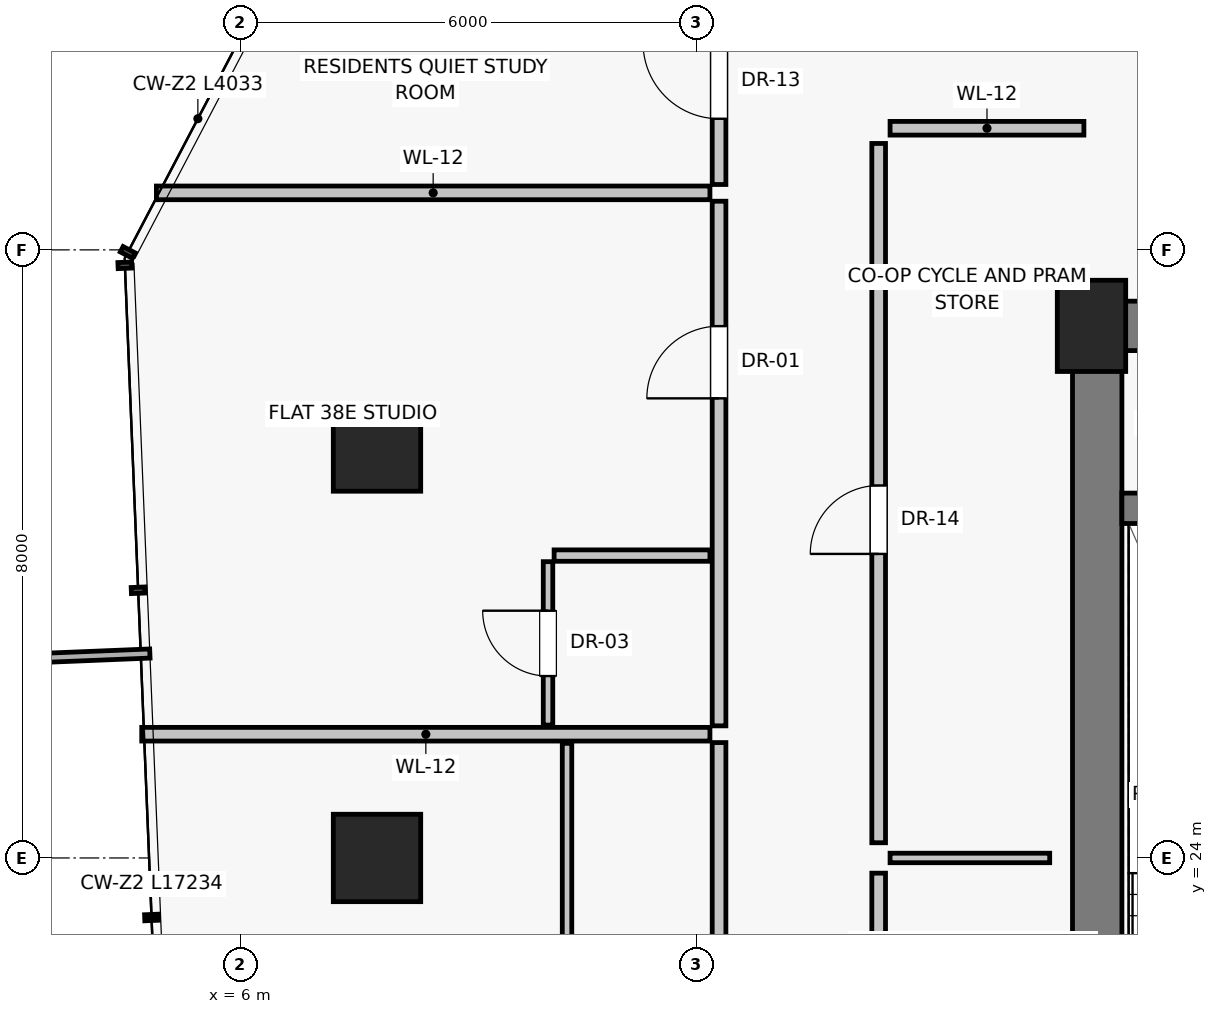
"""IFC4 building model, lengths in metres.
Left out: names, types, materials, properties, quantities, classifications, styles, units other than length and angle.
Written with IfcOpenShell. Run it as: python <this file> out.ifc"""

import sys

from ifc_helpers import new_model, si_unit, direction, frame, frame_2d, origin, origin_2d, place, context, subcontext, project, spatial, rectangle, extrude, source, transform, mapped, element, fill, save


model = new_model("IFC4")
c1 = context("Model", 3, precision=1e-05, world=origin(), true_north=direction((0.0, 1.0)))
c2 = subcontext(c1, "Body", "Model", "MODEL_VIEW")
j1 = project(units=[si_unit("LENGTHUNIT", "METRE"), si_unit("PLANEANGLEUNIT", "RADIAN")], contexts=[c1])
p1 = place(None, origin())
s1 = spatial("IfcSite", under=j1, at=p1, CompositionType="ELEMENT")
p2 = place(p1, origin())
s2 = spatial("IfcBuilding", under=s1, at=p2, CompositionType="ELEMENT")
p3 = place(p2, frame((0.0, 0.0, 136.0)))
s3 = spatial("IfcBuildingStorey", under=s2, at=p3, CompositionType="ELEMENT", Elevation=136.0)
p4 = place(p3, frame((17.2, 31.0, 0.0), z_axis=(0.0, 0.0, 1.0), x_axis=(1.0, 0.0, 0.0)))
e1 = element("IfcColumn", 1, at=p4, inside=s3, PredefinedType="PILASTER", context=c2, shape_type="SweptSolid", body=[
    extrude(rectangle(XDim=0.9, YDim=1.2, at=origin_2d()), origin(), (0.0, 0.0, 1.0), 3.25),
])
for number, where, z_axis, x_axis in (
    (2, (7.8, 29.4, 0.0), (0.0, 0.0, 1.0), (1.0, 0.0, 0.0)),
    (3, (7.8, 24.0, 0.0), (0.0, 0.0, 1.0), (1.0, 0.0, 0.0)),
):
    element("IfcColumn", number, at=place(p3, frame(where, z_axis=z_axis, x_axis=x_axis)), inside=s3, PredefinedType="COLUMN", context=c2, shape_type="SweptSolid", body=[
        extrude(rectangle(XDim=1.15, YDim=1.15, at=origin_2d()), origin(), (0.0, 0.0, 1.0), 3.25),
    ])
p5 = place(p3, frame((17.275, 16.8, 0.0), z_axis=(0.0, 0.0, 1.0), x_axis=(0.0, 1.0, 0.0)))
e4 = element("IfcWall", 4, at=p5, inside=s3, PredefinedType="SHEAR", context=c2, shape_type="SweptSolid", body=[
    extrude(rectangle(XDim=14.2, YDim=0.65, at=frame_2d((7.1, 0.0))), origin(), (0.0, 0.0, 1.0), 3.0),
])
p6 = place(p3, frame((17.2, 31.0, 0.0), z_axis=(0.0, 0.0, 1.0), x_axis=(1.0, 0.0, 0.0)))
e5 = element("IfcWall", 5, at=p6, inside=s3, PredefinedType="SHEAR", context=c2, shape_type="SweptSolid", body=[
    extrude(rectangle(XDim=3.8, YDim=0.65, at=frame_2d((1.9, 0.0))), origin(), (0.0, 0.0, 1.0), 3.0),
])
p7 = place(p6, frame((1.25, 0.0, 0.0)))
e6 = element("IfcOpeningElement", 6, at=p7, cuts=e5, PredefinedType="OPENING", context=c2, shape_type="SweptSolid", body=[
    extrude(rectangle(XDim=0.86, YDim=2.01, at=frame_2d((0.43, 1.005))), frame((0.0, 0.335, 0.0), z_axis=(0.0, -1.0, 0.0), x_axis=(1.0, 0.0, 0.0)), (0.0, 0.0, 1.0), 0.67),
])
p8 = place(p3, frame((17.6, 28.6, 0.0), z_axis=(0.0, 0.0, 1.0), x_axis=(1.0, 0.0, 0.0)))
e7 = element("IfcWall", 7, at=p8, inside=s3, PredefinedType="SHEAR", context=c2, shape_type="SweptSolid", body=[
    extrude(rectangle(XDim=3.4, YDim=0.4, at=frame_2d((1.7, 0.0))), origin(), (0.0, 0.0, 1.0), 3.0),
])
p9 = place(p3, frame((14.4, 14.4, 0.0), z_axis=(0.0, 0.0, 1.0), x_axis=(0.0, 1.0, 0.0)))
e8 = element("IfcWall", 8, at=p9, inside=s3, PredefinedType="PARTITIONING", context=c2, shape_type="SweptSolid", body=[
    extrude(rectangle(XDim=9.4, YDim=0.18, at=frame_2d((4.7, 0.0))), origin(), (0.0, 0.0, 1.0), 3.0),
])
p10 = place(p9, frame((3.8, 0.0, 0.0)))
e9 = element("IfcOpeningElement", 9, at=p10, cuts=e8, PredefinedType="OPENING", context=c2, shape_type="SweptSolid", body=[
    extrude(rectangle(XDim=0.9, YDim=2.01, at=frame_2d((0.45, 1.005))), frame((0.0, 0.1, 0.0), z_axis=(0.0, -1.0, 0.0), x_axis=(1.0, 0.0, 0.0)), (0.0, 0.0, 1.0), 0.2),
])
p11 = place(p3, frame((14.4, 24.2, 0.0), z_axis=(0.0, 0.0, 1.0), x_axis=(0.0, 1.0, 0.0)))
e10 = element("IfcWall", 10, at=p11, inside=s3, PredefinedType="PARTITIONING", context=c2, shape_type="SweptSolid", body=[
    extrude(rectangle(XDim=9.2, YDim=0.18, at=frame_2d((4.6, 0.0))), origin(), (0.0, 0.0, 1.0), 3.0),
])
p12 = place(p11, frame((3.8, 0.0, 0.0)))
e11 = element("IfcOpeningElement", 11, at=p12, cuts=e10, PredefinedType="OPENING", context=c2, shape_type="SweptSolid", body=[
    extrude(rectangle(XDim=0.9, YDim=2.01, at=frame_2d((0.45, 1.005))), frame((0.0, 0.1, 0.0), z_axis=(0.0, -1.0, 0.0), x_axis=(1.0, 0.0, 0.0)), (0.0, 0.0, 1.0), 0.2),
])
p13 = place(p3, frame((14.55, 24.0, 0.0), z_axis=(0.0, 0.0, 1.0), x_axis=(1.0, 0.0, 0.0)))
e12 = element("IfcWall", 12, at=p13, inside=s3, PredefinedType="PARTITIONING", context=c2, shape_type="SweptSolid", body=[
    extrude(rectangle(XDim=2.1, YDim=0.125, at=frame_2d((1.05, 0.0))), origin(), (0.0, 0.0, 1.0), 3.0),
])
p14 = place(p3, frame((14.55, 33.6, 0.0), z_axis=(0.0, 0.0, 1.0), x_axis=(1.0, 0.0, 0.0)))
e13 = element("IfcWall", 13, at=p14, inside=s3, PredefinedType="PARTITIONING", context=c2, shape_type="SweptSolid", body=[
    extrude(rectangle(XDim=2.55, YDim=0.18, at=frame_2d((1.275, 0.0))), origin(), (0.0, 0.0, 1.0), 3.0),
])
p15 = place(p3, frame((12.3, 12.21, 0.0), z_axis=(0.0, 0.0, 1.0), x_axis=(0.0, 1.0, 0.0)))
e14 = element("IfcWall", 14, at=p15, inside=s3, PredefinedType="PARTITIONING", context=c2, shape_type="SweptSolid", body=[
    extrude(rectangle(XDim=13.308, YDim=0.18, at=frame_2d((6.654, 0.0))), origin(), (0.0, 0.0, 1.0), 2.58),
])
p16 = place(p15, frame((4.26, 0.0, 0.0)))
e15 = element("IfcOpeningElement", 15, at=p16, cuts=e14, PredefinedType="OPENING", context=c2, shape_type="SweptSolid", body=[
    extrude(rectangle(XDim=0.95, YDim=2.02, at=frame_2d((0.475, 1.01))), frame((0.0, 0.1, 0.0), z_axis=(0.0, -1.0, 0.0), x_axis=(1.0, 0.0, 0.0)), (0.0, 0.0, 1.0), 0.2),
])
p17 = place(p3, frame((10.3, 19.64, 0.0), z_axis=(0.0, 0.0, 1.0), x_axis=(0.0, 1.0, 0.0)))
e16 = element("IfcWall", 16, at=p17, inside=s3, PredefinedType="PARTITIONING", context=c2, shape_type="SweptSolid", body=[
    extrude(rectangle(XDim=5.868, YDim=0.125, at=frame_2d((2.934, 0.0))), origin(), (0.0, 0.0, 1.0), 3.0),
])
p18 = place(p3, frame((12.18, 25.628, 0.0), z_axis=(0.0, 0.0, 1.0), x_axis=(-1.0, 0.0, 0.0)))
e17 = element("IfcWall", 17, at=p18, inside=s3, PredefinedType="PARTITIONING", context=c2, shape_type="SweptSolid", body=[
    extrude(rectangle(XDim=7.475, YDim=0.18, at=frame_2d((3.738, 0.0))), origin(), (0.0, 0.0, 1.0), 3.0),
])
p19 = place(p3, frame((12.3, 32.86, 0.0), z_axis=(0.0, 0.0, 1.0), x_axis=(0.0, 1.0, 0.0)))
e18 = element("IfcWall", 18, at=p19, inside=s3, PredefinedType="PARTITIONING", context=c2, shape_type="SweptSolid", body=[
    extrude(rectangle(XDim=2.73, YDim=0.18, at=frame_2d((1.365, 0.0))), origin(), (0.0, 0.0, 1.0), 3.0),
])
p20 = place(p19, frame((0.865, 0.0, 0.0)))
e19 = element("IfcOpeningElement", 19, at=p20, cuts=e18, PredefinedType="OPENING", context=c2, shape_type="SweptSolid", body=[
    extrude(rectangle(XDim=1.0, YDim=2.01, at=frame_2d((0.5, 1.005))), frame((0.0, 0.1, 0.0), z_axis=(0.0, -1.0, 0.0), x_axis=(1.0, 0.0, 0.0)), (0.0, 0.0, 1.0), 0.2),
])
p21 = place(p3, frame((12.18, 32.75, 0.0), z_axis=(0.0, 0.0, 1.0), x_axis=(-1.0, 0.0, 0.0)))
e20 = element("IfcWall", 20, at=p21, inside=s3, PredefinedType="PARTITIONING", context=c2, shape_type="SweptSolid", body=[
    extrude(rectangle(XDim=7.282, YDim=0.18, at=frame_2d((3.641, 0.0))), origin(), (0.0, 0.0, 1.0), 3.0),
])
p22 = place(p3, frame((12.3, 25.738, 0.0), z_axis=(0.0, 0.0, 1.0), x_axis=(0.0, 1.0, 0.0)))
e21 = element("IfcWall", 21, at=p22, inside=s3, PredefinedType="PARTITIONING", context=c2, shape_type="SweptSolid", body=[
    extrude(rectangle(XDim=6.902, YDim=0.18, at=frame_2d((3.451, 0.0))), origin(), (0.0, 0.0, 1.0), 2.58),
])
p23 = place(p22, frame((4.309, 0.0, 0.0)))
e22 = element("IfcOpeningElement", 22, at=p23, cuts=e21, PredefinedType="OPENING", context=c2, shape_type="SweptSolid", body=[
    extrude(rectangle(XDim=0.95, YDim=2.02, at=frame_2d((0.475, 1.01))), frame((0.0, 0.1, 0.0), z_axis=(0.0, -1.0, 0.0), x_axis=(1.0, 0.0, 0.0)), (0.0, 0.0, 1.0), 0.2),
])
p24 = place(p3, frame((12.18, 27.978, 0.0), z_axis=(0.0, 0.0, 1.0), x_axis=(-1.0, 0.0, 0.0)))
e23 = element("IfcWall", 23, at=p24, inside=s3, PredefinedType="PARTITIONING", context=c2, shape_type="SweptSolid", body=[
    extrude(rectangle(XDim=2.05, YDim=0.15, at=frame_2d((1.025, 0.0))), origin(), (0.0, 0.0, 1.0), 3.0),
])
p25 = place(p3, frame((10.05, 25.748, 0.0), z_axis=(0.0, 0.0, 1.0), x_axis=(0.0, 1.0, 0.0)))
e24 = element("IfcWall", 24, at=p25, inside=s3, PredefinedType="PARTITIONING", context=c2, shape_type="SweptSolid", body=[
    extrude(rectangle(XDim=2.15, YDim=0.125, at=frame_2d((1.075, 0.0))), origin(), (0.0, 0.0, 1.0), 3.0),
])
p26 = place(p25, frame((0.645, 0.0, 0.0)))
e25 = element("IfcOpeningElement", 25, at=p26, cuts=e24, PredefinedType="OPENING", context=c2, shape_type="SweptSolid", body=[
    extrude(rectangle(XDim=0.86, YDim=2.01, at=frame_2d((0.43, 1.005))), frame((0.0, 0.073, 0.0), z_axis=(0.0, -1.0, 0.0), x_axis=(1.0, 0.0, 0.0)), (0.0, 0.0, 1.0), 0.145),
])
m1 = source(origin(), c2, "Body", "SweptSolid", [
    extrude(rectangle(XDim=0.9, YDim=2.01, at=frame_2d((0.45, 1.005))), frame((0.0, 0.025, 0.0), z_axis=(0.0, -1.0, 0.0), x_axis=(1.0, 0.0, 0.0)), (0.0, 0.0, 1.0), 0.05),
])
p27 = place(p12, origin())
e26 = element("IfcDoor", 26, at=p27, inside=s3, OperationType="SINGLE_SWING_LEFT", PredefinedType="DOOR", context=c2, shape_type="MappedRepresentation", body=[
    mapped(m1, transform((0.0, 0.0, 0.0), scale=1.0)),
])
fill(e11, e26)
m2 = source(origin(), c2, "Body", "SweptSolid", [
    extrude(rectangle(XDim=1.0, YDim=2.01, at=frame_2d((0.5, 1.005))), frame((0.0, 0.025, 0.0), z_axis=(0.0, -1.0, 0.0), x_axis=(1.0, 0.0, 0.0)), (0.0, 0.0, 1.0), 0.05),
])
p28 = place(p20, origin())
e27 = element("IfcDoor", 27, at=p28, inside=s3, OperationType="SINGLE_SWING_RIGHT", PredefinedType="DOOR", context=c2, shape_type="MappedRepresentation", body=[
    mapped(m2, transform((0.0, 0.0, 0.0), scale=1.0)),
])
fill(e19, e27)
m3 = source(origin(), c2, "Body", "SweptSolid", [
    extrude(rectangle(XDim=0.95, YDim=2.02, at=frame_2d((0.475, 1.01))), frame((0.0, 0.025, 0.0), z_axis=(0.0, -1.0, 0.0), x_axis=(1.0, 0.0, 0.0)), (0.0, 0.0, 1.0), 0.05),
])
p29 = place(p23, origin())
e28 = element("IfcDoor", 28, at=p29, inside=s3, OperationType="SINGLE_SWING_LEFT", PredefinedType="DOOR", context=c2, shape_type="MappedRepresentation", body=[
    mapped(m3, transform((0.0, 0.0, 0.0), scale=1.0)),
])
fill(e22, e28)
m4 = source(origin(), c2, "Body", "SweptSolid", [
    extrude(rectangle(XDim=0.86, YDim=2.01, at=frame_2d((0.43, 1.005))), frame((0.0, 0.025, 0.0), z_axis=(0.0, -1.0, 0.0), x_axis=(1.0, 0.0, 0.0)), (0.0, 0.0, 1.0), 0.05),
])
p30 = place(p26, origin())
e29 = element("IfcDoor", 29, at=p30, inside=s3, OperationType="SINGLE_SWING_RIGHT", PredefinedType="DOOR", context=c2, shape_type="MappedRepresentation", body=[
    mapped(m4, transform((0.0, 0.0, 0.0), scale=1.0)),
])
fill(e25, e29)
save(model, sys.argv[1])
